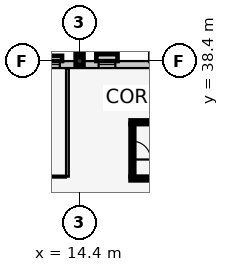
"""IFC4 building model, lengths in metres.
Left out: names, types, materials, properties, quantities, classifications, styles, units other than length and angle.
Written with IfcOpenShell. Run it as: python <this file> out.ifc"""

import sys

from ifc_helpers import new_model, si_unit, direction, frame, frame_2d, origin, origin_2d, place, context, subcontext, project, spatial, rectangle, extrude, element, fill, save


model = new_model("IFC4")
c1 = context("Model", 3, precision=1e-05, world=origin(), true_north=direction((0.0, 1.0)))
c2 = subcontext(c1, "Body", "Model", "MODEL_VIEW")
j1 = project(units=[si_unit("LENGTHUNIT", "METRE"), si_unit("PLANEANGLEUNIT", "RADIAN")], contexts=[c1])
p1 = place(None, origin())
s1 = spatial("IfcSite", under=j1, at=p1, CompositionType="ELEMENT")
p2 = place(p1, origin())
s2 = spatial("IfcBuilding", under=s1, at=p2, CompositionType="ELEMENT")
p3 = place(p2, frame((0.0, 0.0, 5.4)))
s3 = spatial("IfcBuildingStorey", under=s2, at=p3, CompositionType="ELEMENT", Elevation=5.4)
for number, where, z_axis, x_axis in (
    (1, (14.4, 38.4, 0.0), (0.0, 0.0, 1.0), (1.0, 0.0, 0.0)),
    (2, (14.4, 39.2, 0.0), (0.0, 0.0, 1.0), (1.0, 0.0, 0.0)),
):
    element("IfcColumn", number, at=place(p3, frame(where, z_axis=z_axis, x_axis=x_axis)), inside=s3, PredefinedType="COLUMN", context=c2, shape_type="SweptSolid", body=[
        extrude(rectangle(XDim=0.52, YDim=0.52, at=origin_2d()), origin(), (0.0, 0.0, 1.0), 4.2),
    ])
p4 = place(p3, frame((0.0, 38.17, 0.0), z_axis=(0.0, 0.0, 1.0), x_axis=(1.0, 0.0, 0.0)))
e3 = element("IfcWall", 3, at=p4, inside=s3, PredefinedType="SOLIDWALL", context=c2, shape_type="SweptSolid", body=[
    extrude(rectangle(XDim=57.6, YDim=0.46, at=frame_2d((28.8, 0.0))), origin(), (0.0, 0.0, 1.0), 3.215),
])
p5 = place(p4, frame((1.08, 0.0, 0.9)))
e4 = element("IfcOpeningElement", 4, at=p5, cuts=e3, PredefinedType="OPENING", context=c2, shape_type="SweptSolid", body=[
    extrude(rectangle(XDim=1.44, YDim=1.75, at=frame_2d((0.72, 0.875))), frame((0.0, 0.242, 0.0), z_axis=(0.0, -1.0, 0.0), x_axis=(1.0, 0.0, 0.0)), (0.0, 0.0, 1.0), 0.484),
])
p6 = place(p4, frame((4.65, 0.0, 0.9)))
e5 = element("IfcOpeningElement", 5, at=p6, cuts=e3, PredefinedType="OPENING", context=c2, shape_type="SweptSolid", body=[
    extrude(rectangle(XDim=1.5, YDim=1.75, at=frame_2d((0.75, 0.875))), frame((0.0, 0.242, 0.0), z_axis=(0.0, -1.0, 0.0), x_axis=(1.0, 0.0, 0.0)), (0.0, 0.0, 1.0), 0.484),
])
p7 = place(p4, frame((8.55, 0.0, 0.9)))
e6 = element("IfcOpeningElement", 6, at=p7, cuts=e3, PredefinedType="OPENING", context=c2, shape_type="SweptSolid", body=[
    extrude(rectangle(XDim=0.9, YDim=1.35, at=frame_2d((0.45, 0.675))), frame((0.0, 0.242, 0.0), z_axis=(0.0, -1.0, 0.0), x_axis=(1.0, 0.0, 0.0)), (0.0, 0.0, 1.0), 0.484),
])
p8 = place(p4, frame((12.1, 0.0, 0.9)))
e7 = element("IfcOpeningElement", 7, at=p8, cuts=e3, PredefinedType="OPENING", context=c2, shape_type="SweptSolid", body=[
    extrude(rectangle(XDim=1.0, YDim=1.35, at=frame_2d((0.5, 0.675))), frame((0.0, 0.242, 0.0), z_axis=(0.0, -1.0, 0.0), x_axis=(1.0, 0.0, 0.0)), (0.0, 0.0, 1.0), 0.484),
])
p9 = place(p4, frame((15.65, 0.0, 0.9)))
e8 = element("IfcOpeningElement", 8, at=p9, cuts=e3, PredefinedType="OPENING", context=c2, shape_type="SweptSolid", body=[
    extrude(rectangle(XDim=1.1, YDim=1.35, at=frame_2d((0.55, 0.675))), frame((0.0, 0.242, 0.0), z_axis=(0.0, -1.0, 0.0), x_axis=(1.0, 0.0, 0.0)), (0.0, 0.0, 1.0), 0.484),
])
p10 = place(p4, frame((19.2, 0.0, 0.9)))
e9 = element("IfcOpeningElement", 9, at=p10, cuts=e3, PredefinedType="OPENING", context=c2, shape_type="SweptSolid", body=[
    extrude(rectangle(XDim=1.2, YDim=1.35, at=frame_2d((0.6, 0.675))), frame((0.0, 0.242, 0.0), z_axis=(0.0, -1.0, 0.0), x_axis=(1.0, 0.0, 0.0)), (0.0, 0.0, 1.0), 0.484),
])
p11 = place(p4, frame((22.75, 0.0, 0.9)))
e10 = element("IfcOpeningElement", 10, at=p11, cuts=e3, PredefinedType="OPENING", context=c2, shape_type="SweptSolid", body=[
    extrude(rectangle(XDim=1.3, YDim=1.35, at=frame_2d((0.65, 0.675))), frame((0.0, 0.242, 0.0), z_axis=(0.0, -1.0, 0.0), x_axis=(1.0, 0.0, 0.0)), (0.0, 0.0, 1.0), 0.484),
])
p12 = place(p4, frame((30.125, 0.0, 0.9)))
e11 = element("IfcOpeningElement", 11, at=p12, cuts=e3, PredefinedType="OPENING", context=c2, shape_type="SweptSolid", body=[
    extrude(rectangle(XDim=0.95, YDim=1.45, at=frame_2d((0.475, 0.725))), frame((0.0, 0.242, 0.0), z_axis=(0.0, -1.0, 0.0), x_axis=(1.0, 0.0, 0.0)), (0.0, 0.0, 1.0), 0.484),
])
p13 = place(p4, frame((33.675, 0.0, 0.9)))
e12 = element("IfcOpeningElement", 12, at=p13, cuts=e3, PredefinedType="OPENING", context=c2, shape_type="SweptSolid", body=[
    extrude(rectangle(XDim=1.05, YDim=1.45, at=frame_2d((0.525, 0.725))), frame((0.0, 0.242, 0.0), z_axis=(0.0, -1.0, 0.0), x_axis=(1.0, 0.0, 0.0)), (0.0, 0.0, 1.0), 0.484),
])
p14 = place(p4, frame((40.775, 0.0, 0.9)))
e13 = element("IfcOpeningElement", 13, at=p14, cuts=e3, PredefinedType="OPENING", context=c2, shape_type="SweptSolid", body=[
    extrude(rectangle(XDim=1.25, YDim=1.45, at=frame_2d((0.625, 0.725))), frame((0.0, 0.242, 0.0), z_axis=(0.0, -1.0, 0.0), x_axis=(1.0, 0.0, 0.0)), (0.0, 0.0, 1.0), 0.484),
])
p15 = place(p4, frame((44.325, 0.0, 0.9)))
e14 = element("IfcOpeningElement", 14, at=p15, cuts=e3, PredefinedType="OPENING", context=c2, shape_type="SweptSolid", body=[
    extrude(rectangle(XDim=1.35, YDim=1.45, at=frame_2d((0.675, 0.725))), frame((0.0, 0.242, 0.0), z_axis=(0.0, -1.0, 0.0), x_axis=(1.0, 0.0, 0.0)), (0.0, 0.0, 1.0), 0.484),
])
p16 = place(p4, frame((51.75, 0.0, 0.9)))
e15 = element("IfcOpeningElement", 15, at=p16, cuts=e3, PredefinedType="OPENING", context=c2, shape_type="SweptSolid", body=[
    extrude(rectangle(XDim=0.9, YDim=1.6, at=frame_2d((0.45, 0.8))), frame((0.0, 0.242, 0.0), z_axis=(0.0, -1.0, 0.0), x_axis=(1.0, 0.0, 0.0)), (0.0, 0.0, 1.0), 0.484),
])
p17 = place(p4, frame((55.275, 0.0, 0.9)))
e16 = element("IfcOpeningElement", 16, at=p17, cuts=e3, PredefinedType="OPENING", context=c2, shape_type="SweptSolid", body=[
    extrude(rectangle(XDim=1.05, YDim=1.6, at=frame_2d((0.525, 0.8))), frame((0.0, 0.242, 0.0), z_axis=(0.0, -1.0, 0.0), x_axis=(1.0, 0.0, 0.0)), (0.0, 0.0, 1.0), 0.484),
])
for number, where, z_axis, x_axis in (
    (17, (17.75, 30.675, 0.0), (0.0, 0.0, 1.0), (1.0, 0.0, 0.0)),
    (18, (26.65, 34.375, 0.0), (0.0, 0.0, 1.0), (-1.0, 0.0, 0.0)),
):
    element("IfcWall", number, at=place(p3, frame(where, z_axis=z_axis, x_axis=x_axis)), inside=s3, PredefinedType="SHEAR", context=c2, shape_type="SweptSolid", body=[
        extrude(rectangle(XDim=8.9, YDim=0.25, at=frame_2d((4.45, 0.0))), origin(), (0.0, 0.0, 1.0), 3.92),
    ])
p18 = place(p3, frame((17.875, 34.25, 0.0), z_axis=(0.0, 0.0, 1.0), x_axis=(0.0, -1.0, 0.0)))
e19 = element("IfcWall", 19, at=p18, inside=s3, PredefinedType="SHEAR", context=c2, shape_type="SweptSolid", body=[
    extrude(rectangle(XDim=3.45, YDim=0.25, at=frame_2d((1.725, 0.0))), origin(), (0.0, 0.0, 1.0), 3.92),
])
p19 = place(p18, frame((1.125, 0.0, 0.0)))
e20 = element("IfcOpeningElement", 20, at=p19, cuts=e19, PredefinedType="OPENING", context=c2, shape_type="SweptSolid", body=[
    extrude(rectangle(XDim=1.2, YDim=2.15, at=frame_2d((0.6, 1.075))), frame((0.0, 0.137, 0.0), z_axis=(0.0, -1.0, 0.0), x_axis=(1.0, 0.0, 0.0)), (0.0, 0.0, 1.0), 0.274),
])
p20 = place(p3, frame((13.6, 30.8, 0.0), z_axis=(0.0, 0.0, 1.0), x_axis=(0.0, 1.0, 0.0)))
e21 = element("IfcWall", 21, at=p20, inside=s3, PredefinedType="PARTITIONING", context=c2, shape_type="SweptSolid", body=[
    extrude(rectangle(XDim=7.13, YDim=0.18, at=frame_2d((3.565, 0.0))), origin(), (0.0, 0.0, 1.0), 3.92),
])
p21 = place(p3, frame((0.47, 30.8, 0.0), z_axis=(0.0, 0.0, 1.0), x_axis=(1.0, 0.0, 0.0)))
e22 = element("IfcWall", 22, at=p21, inside=s3, PredefinedType="PARTITIONING", context=c2, shape_type="SweptSolid", body=[
    extrude(rectangle(XDim=13.03, YDim=0.125, at=frame_2d((6.515, 0.0))), origin(), (0.0, 0.0, 1.0), 3.92),
])
p22 = place(p21, frame((6.025, 0.0, 0.0)))
e23 = element("IfcOpeningElement", 23, at=p22, cuts=e22, PredefinedType="OPENING", context=c2, shape_type="SweptSolid", body=[
    extrude(rectangle(XDim=0.98, YDim=2.12, at=frame_2d((0.49, 1.06))), frame((0.0, 0.074, 0.0), z_axis=(0.0, -1.0, 0.0), x_axis=(1.0, 0.0, 0.0)), (0.0, 0.0, 1.0), 0.149),
])
p23 = place(p8, origin())
e24 = element("IfcWindow", 24, at=p23, inside=s3, PartitioningType="SINGLE_PANEL", PredefinedType="WINDOW", context=c2, shape_type="SweptSolid", body=[
    extrude(rectangle(XDim=1.0, YDim=1.35, at=frame_2d((0.5, 0.675))), frame((0.0, 0.03, 0.0), z_axis=(0.0, -1.0, 0.0), x_axis=(1.0, 0.0, 0.0)), (0.0, 0.0, 1.0), 0.06),
])
fill(e7, e24)
p24 = place(p9, origin())
e25 = element("IfcWindow", 25, at=p24, inside=s3, PartitioningType="SINGLE_PANEL", PredefinedType="WINDOW", context=c2, shape_type="SweptSolid", body=[
    extrude(rectangle(XDim=1.1, YDim=1.35, at=frame_2d((0.55, 0.675))), frame((0.0, 0.03, 0.0), z_axis=(0.0, -1.0, 0.0), x_axis=(1.0, 0.0, 0.0)), (0.0, 0.0, 1.0), 0.06),
])
fill(e8, e25)
p25 = place(p19, origin())
e26 = element("IfcDoor", 26, at=p25, inside=s3, OperationType="SINGLE_SWING_RIGHT", PredefinedType="DOOR", context=c2, shape_type="SweptSolid", body=[
    extrude(rectangle(XDim=1.2, YDim=2.15, at=frame_2d((0.6, 1.075))), frame((0.0, 0.025, 0.0), z_axis=(0.0, -1.0, 0.0), x_axis=(1.0, 0.0, 0.0)), (0.0, 0.0, 1.0), 0.05),
])
fill(e20, e26)
save(model, sys.argv[1])
